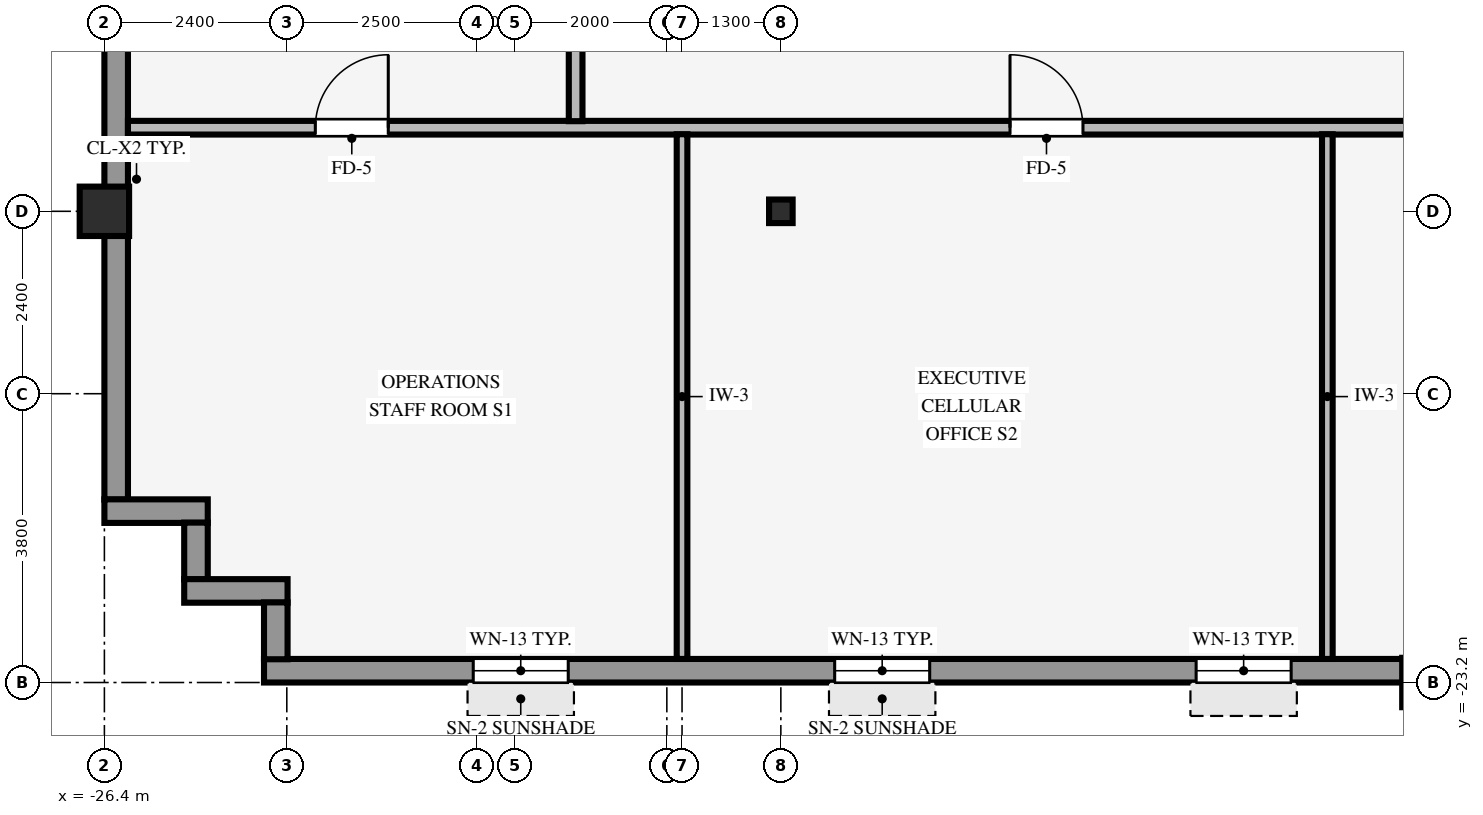
"""IFC4 building model, lengths in metres.
Left out: names, types, materials, properties, quantities, classifications, styles, units other than length and angle.
Written with IfcOpenShell. Run it as: python <this file> out.ifc"""

import sys

from ifc_helpers import new_model, si_unit, direction, frame, frame_2d, origin, origin_2d, place, context, subcontext, project, spatial, rectangle, hollow_rectangle, i_section, extrude, source, transform, mapped, element, fill, save


model = new_model("IFC4")
c1 = context("Model", 3, precision=1e-05, world=origin(), true_north=direction((0.0, 1.0)))
c2 = subcontext(c1, "Body", "Model", "MODEL_VIEW")
j1 = project(units=[si_unit("LENGTHUNIT", "METRE"), si_unit("PLANEANGLEUNIT", "RADIAN")], contexts=[c1])
p1 = place(None, origin())
s1 = spatial("IfcSite", under=j1, at=p1, CompositionType="ELEMENT")
p2 = place(p1, origin())
s2 = spatial("IfcBuilding", under=s1, at=p2, CompositionType="ELEMENT")
p3 = place(p2, frame((0.0, 0.0, 178.6)))
s3 = spatial("IfcBuildingStorey", under=s2, at=p3, CompositionType="ELEMENT", Elevation=178.6)
for number, where, z_axis, x_axis in (
    (1, (-26.4, -17.0, 0.0), (0.0, 0.0, 1.0), (1.0, 0.0, 0.0)),
    (2, (-9.0, -23.2, 0.0), (0.0, 0.0, 1.0), (1.0, 0.0, 0.0)),
):
    element("IfcColumn", number, at=place(p3, frame(where, z_axis=z_axis, x_axis=x_axis)), inside=s3, PredefinedType="COLUMN", context=c2, shape_type="SweptSolid", body=[
        extrude(hollow_rectangle(XDim=0.65, YDim=0.65, WallThickness=0.04, InnerFilletRadius=0.04, OuterFilletRadius=0.08, at=origin_2d()), origin(), (0.0, 0.0, 1.0), 3.37),
    ])
p4 = place(p3, frame((-17.5, -17.0, 0.0), z_axis=(0.0, 0.0, 1.0), x_axis=(1.0, 0.0, 0.0)))
e3 = element("IfcColumn", 3, at=p4, inside=s3, PredefinedType="COLUMN", context=c2, shape_type="SweptSolid", body=[
    extrude(i_section(OverallWidth=0.31, OverallDepth=0.31, WebThickness=0.015, FlangeThickness=0.015, FilletRadius=0.015, at=origin_2d()), origin(), (0.0, 0.0, 1.0), 3.37),
])
p5 = place(p3, frame((-24.3, -23.045, 0.0), z_axis=(0.0, 0.0, 1.0), x_axis=(1.0, 0.0, 0.0)))
e4 = element("IfcWall", 4, at=p5, inside=s3, PredefinedType="STANDARD", context=c2, shape_type="SweptSolid", body=[
    extrude(rectangle(XDim=44.8, YDim=0.31, at=frame_2d((22.4, 0.0))), origin(), (0.0, 0.0, 1.0), 2.705),
])
p6 = place(p5, frame((2.753, 0.0, 0.8)))
e5 = element("IfcOpeningElement", 5, at=p6, cuts=e4, PredefinedType="OPENING", context=c2, shape_type="SweptSolid", body=[
    extrude(rectangle(XDim=1.25, YDim=1.52, at=frame_2d((0.625, 0.76))), frame((0.0, 0.165, 0.0), z_axis=(0.0, -1.0, 0.0), x_axis=(1.0, 0.0, 0.0)), (0.0, 0.0, 1.0), 0.33),
])
p7 = place(p5, frame((7.508, 0.0, 0.8)))
e6 = element("IfcOpeningElement", 6, at=p7, cuts=e4, PredefinedType="OPENING", context=c2, shape_type="SweptSolid", body=[
    extrude(rectangle(XDim=1.25, YDim=1.52, at=frame_2d((0.625, 0.76))), frame((0.0, 0.165, 0.0), z_axis=(0.0, -1.0, 0.0), x_axis=(1.0, 0.0, 0.0)), (0.0, 0.0, 1.0), 0.33),
])
p8 = place(p5, frame((12.264, 0.0, 0.8)))
e7 = element("IfcOpeningElement", 7, at=p8, cuts=e4, PredefinedType="OPENING", context=c2, shape_type="SweptSolid", body=[
    extrude(rectangle(XDim=1.25, YDim=1.52, at=frame_2d((0.625, 0.76))), frame((0.0, 0.165, 0.0), z_axis=(0.0, -1.0, 0.0), x_axis=(1.0, 0.0, 0.0)), (0.0, 0.0, 1.0), 0.33),
])
p9 = place(p5, frame((17.019, 0.0, 0.8)))
e8 = element("IfcOpeningElement", 8, at=p9, cuts=e4, PredefinedType="OPENING", context=c2, shape_type="SweptSolid", body=[
    extrude(rectangle(XDim=1.25, YDim=1.52, at=frame_2d((0.625, 0.76))), frame((0.0, 0.165, 0.0), z_axis=(0.0, -1.0, 0.0), x_axis=(1.0, 0.0, 0.0)), (0.0, 0.0, 1.0), 0.33),
])
p10 = place(p5, frame((21.775, 0.0, 0.8)))
e9 = element("IfcOpeningElement", 9, at=p10, cuts=e4, PredefinedType="OPENING", context=c2, shape_type="SweptSolid", body=[
    extrude(rectangle(XDim=1.25, YDim=1.52, at=frame_2d((0.625, 0.76))), frame((0.0, 0.165, 0.0), z_axis=(0.0, -1.0, 0.0), x_axis=(1.0, 0.0, 0.0)), (0.0, 0.0, 1.0), 0.33),
])
p11 = place(p5, frame((26.531, 0.0, 0.8)))
e10 = element("IfcOpeningElement", 10, at=p11, cuts=e4, PredefinedType="OPENING", context=c2, shape_type="SweptSolid", body=[
    extrude(rectangle(XDim=1.25, YDim=1.52, at=frame_2d((0.625, 0.76))), frame((0.0, 0.165, 0.0), z_axis=(0.0, -1.0, 0.0), x_axis=(1.0, 0.0, 0.0)), (0.0, 0.0, 1.0), 0.33),
])
p12 = place(p5, frame((30.836, 0.0, 0.8)))
e11 = element("IfcOpeningElement", 11, at=p12, cuts=e4, PredefinedType="OPENING", context=c2, shape_type="SweptSolid", body=[
    extrude(rectangle(XDim=1.25, YDim=1.52, at=frame_2d((0.625, 0.76))), frame((0.0, 0.165, 0.0), z_axis=(0.0, -1.0, 0.0), x_axis=(1.0, 0.0, 0.0)), (0.0, 0.0, 1.0), 0.33),
])
p13 = place(p5, frame((36.042, 0.0, 0.8)))
e12 = element("IfcOpeningElement", 12, at=p13, cuts=e4, PredefinedType="OPENING", context=c2, shape_type="SweptSolid", body=[
    extrude(rectangle(XDim=1.25, YDim=1.52, at=frame_2d((0.625, 0.76))), frame((0.0, 0.165, 0.0), z_axis=(0.0, -1.0, 0.0), x_axis=(1.0, 0.0, 0.0)), (0.0, 0.0, 1.0), 0.33),
])
p14 = place(p5, frame((40.797, 0.0, 0.8)))
e13 = element("IfcOpeningElement", 13, at=p14, cuts=e4, PredefinedType="OPENING", context=c2, shape_type="SweptSolid", body=[
    extrude(rectangle(XDim=1.25, YDim=1.52, at=frame_2d((0.625, 0.76))), frame((0.0, 0.165, 0.0), z_axis=(0.0, -1.0, 0.0), x_axis=(1.0, 0.0, 0.0)), (0.0, 0.0, 1.0), 0.33),
])
p15 = place(p3, frame((-26.245, -20.794, 0.0), z_axis=(0.0, 0.0, 1.0), x_axis=(0.0, 1.0, 0.0)))
e14 = element("IfcWall", 14, at=p15, inside=s3, PredefinedType="STANDARD", context=c2, shape_type="SweptSolid", body=[
    extrude(rectangle(XDim=37.788, YDim=0.31, at=frame_2d((18.894, 0.0))), origin(), (0.0, 0.0, 1.0), 2.705),
])
p16 = place(p15, frame((7.644, 0.0, 0.8)))
e15 = element("IfcOpeningElement", 15, at=p16, cuts=e14, PredefinedType="OPENING", context=c2, shape_type="SweptSolid", body=[
    extrude(rectangle(XDim=2.05, YDim=1.52, at=frame_2d((1.025, 0.76))), frame((0.0, 0.165, 0.0), z_axis=(0.0, -1.0, 0.0), x_axis=(1.0, 0.0, 0.0)), (0.0, 0.0, 1.0), 0.33),
])
p17 = place(p15, frame((12.756, 0.0, 0.8)))
e16 = element("IfcOpeningElement", 16, at=p17, cuts=e14, PredefinedType="OPENING", context=c2, shape_type="SweptSolid", body=[
    extrude(rectangle(XDim=2.05, YDim=1.52, at=frame_2d((1.025, 0.76))), frame((0.0, 0.165, 0.0), z_axis=(0.0, -1.0, 0.0), x_axis=(1.0, 0.0, 0.0)), (0.0, 0.0, 1.0), 0.33),
])
p18 = place(p15, frame((17.869, 0.0, 0.8)))
e17 = element("IfcOpeningElement", 17, at=p18, cuts=e14, PredefinedType="OPENING", context=c2, shape_type="SweptSolid", body=[
    extrude(rectangle(XDim=2.05, YDim=1.52, at=frame_2d((1.025, 0.76))), frame((0.0, 0.165, 0.0), z_axis=(0.0, -1.0, 0.0), x_axis=(1.0, 0.0, 0.0)), (0.0, 0.0, 1.0), 0.33),
])
p19 = place(p15, frame((22.531, 0.0, 0.8)))
e18 = element("IfcOpeningElement", 18, at=p19, cuts=e14, PredefinedType="OPENING", context=c2, shape_type="SweptSolid", body=[
    extrude(rectangle(XDim=2.05, YDim=1.52, at=frame_2d((1.025, 0.76))), frame((0.0, 0.165, 0.0), z_axis=(0.0, -1.0, 0.0), x_axis=(1.0, 0.0, 0.0)), (0.0, 0.0, 1.0), 0.33),
])
p20 = place(p15, frame((27.194, 0.0, 0.8)))
e19 = element("IfcOpeningElement", 19, at=p20, cuts=e14, PredefinedType="OPENING", context=c2, shape_type="SweptSolid", body=[
    extrude(rectangle(XDim=2.05, YDim=1.52, at=frame_2d((1.025, 0.76))), frame((0.0, 0.165, 0.0), z_axis=(0.0, -1.0, 0.0), x_axis=(1.0, 0.0, 0.0)), (0.0, 0.0, 1.0), 0.33),
])
p21 = place(p15, frame((33.207, 0.0, 0.8)))
e20 = element("IfcOpeningElement", 20, at=p21, cuts=e14, PredefinedType="OPENING", context=c2, shape_type="SweptSolid", body=[
    extrude(rectangle(XDim=2.05, YDim=1.52, at=frame_2d((1.025, 0.76))), frame((0.0, 0.165, 0.0), z_axis=(0.0, -1.0, 0.0), x_axis=(1.0, 0.0, 0.0)), (0.0, 0.0, 1.0), 0.33),
])
p22 = place(p3, frame((-26.4, -20.945, 0.0), z_axis=(0.0, 0.0, 1.0), x_axis=(1.0, 0.0, 0.0)))
e21 = element("IfcWall", 21, at=p22, inside=s3, PredefinedType="STANDARD", context=c2, shape_type="SweptSolid", body=[
    extrude(rectangle(XDim=1.36, YDim=0.31, at=frame_2d((0.68, 0.0))), origin(), (0.0, 0.0, 1.0), 3.36),
])
p23 = place(p3, frame((-25.195, -21.844, 0.0), z_axis=(0.0, 0.0, 1.0), x_axis=(0.0, 1.0, 0.0)))
e22 = element("IfcWall", 22, at=p23, inside=s3, PredefinedType="STANDARD", context=c2, shape_type="SweptSolid", body=[
    extrude(rectangle(XDim=0.748, YDim=0.31, at=frame_2d((0.374, 0.0))), origin(), (0.0, 0.0, 1.0), 3.36),
])
p24 = place(p3, frame((-25.35, -21.995, 0.0), z_axis=(0.0, 0.0, 1.0), x_axis=(1.0, 0.0, 0.0)))
e23 = element("IfcWall", 23, at=p24, inside=s3, PredefinedType="STANDARD", context=c2, shape_type="SweptSolid", body=[
    extrude(rectangle(XDim=1.36, YDim=0.31, at=frame_2d((0.68, 0.0))), origin(), (0.0, 0.0, 1.0), 3.36),
])
p25 = place(p3, frame((-24.145, -22.894, 0.0), z_axis=(0.0, 0.0, 1.0), x_axis=(0.0, 1.0, 0.0)))
e24 = element("IfcWall", 24, at=p25, inside=s3, PredefinedType="STANDARD", context=c2, shape_type="SweptSolid", body=[
    extrude(rectangle(XDim=0.748, YDim=0.31, at=frame_2d((0.374, 0.0))), origin(), (0.0, 0.0, 1.0), 3.36),
])
p26 = place(p3, frame((-26.09, -15.9, 0.0), z_axis=(0.0, 0.0, 1.0), x_axis=(1.0, 0.0, 0.0)))
e25 = element("IfcWall", 25, at=p26, inside=s3, PredefinedType="PARTITIONING", context=c2, shape_type="SweptSolid", body=[
    extrude(rectangle(XDim=48.38, YDim=0.18, at=frame_2d((24.19, 0.0))), origin(), (0.0, 0.0, 1.0), 3.36),
])
p27 = place(p26, frame((40.51, 0.0, 0.0)))
e26 = element("IfcOpeningElement", 26, at=p27, cuts=e25, PredefinedType="OPENING", context=c2, shape_type="SweptSolid", body=[
    extrude(rectangle(XDim=0.96, YDim=2.1, at=frame_2d((0.48, 1.05))), frame((0.0, 0.1, 0.0), z_axis=(0.0, -1.0, 0.0), x_axis=(1.0, 0.0, 0.0)), (0.0, 0.0, 1.0), 0.2),
])
p28 = place(p26, frame((19.995, 0.0, 0.0)))
e27 = element("IfcOpeningElement", 27, at=p28, cuts=e25, PredefinedType="OPENING", context=c2, shape_type="SweptSolid", body=[
    extrude(rectangle(XDim=0.96, YDim=2.1, at=frame_2d((0.48, 1.05))), frame((0.0, 0.1, 0.0), z_axis=(0.0, -1.0, 0.0), x_axis=(1.0, 0.0, 0.0)), (0.0, 0.0, 1.0), 0.2),
])
p29 = place(p26, frame((28.45, 0.0, 0.0)))
e28 = element("IfcOpeningElement", 28, at=p29, cuts=e25, PredefinedType="OPENING", context=c2, shape_type="SweptSolid", body=[
    extrude(rectangle(XDim=0.96, YDim=2.1, at=frame_2d((0.48, 1.05))), frame((0.0, 0.1, 0.0), z_axis=(0.0, -1.0, 0.0), x_axis=(1.0, 0.0, 0.0)), (0.0, 0.0, 1.0), 0.2),
])
p30 = place(p26, frame((11.605, 0.0, 0.0)))
e29 = element("IfcOpeningElement", 29, at=p30, cuts=e25, PredefinedType="OPENING", context=c2, shape_type="SweptSolid", body=[
    extrude(rectangle(XDim=0.96, YDim=2.1, at=frame_2d((0.48, 1.05))), frame((0.0, 0.1, 0.0), z_axis=(0.0, -1.0, 0.0), x_axis=(1.0, 0.0, 0.0)), (0.0, 0.0, 1.0), 0.2),
])
p31 = place(p26, frame((2.465, 0.0, 0.0)))
e30 = element("IfcOpeningElement", 30, at=p31, cuts=e25, PredefinedType="OPENING", context=c2, shape_type="SweptSolid", body=[
    extrude(rectangle(XDim=0.96, YDim=2.1, at=frame_2d((0.48, 1.05))), frame((0.0, 0.1, 0.0), z_axis=(0.0, -1.0, 0.0), x_axis=(1.0, 0.0, 0.0)), (0.0, 0.0, 1.0), 0.2),
])
p32 = place(p3, frame((-20.2, -15.814, 0.0), z_axis=(0.0, 0.0, 1.0), x_axis=(0.0, 1.0, 0.0)))
e31 = element("IfcWall", 31, at=p32, inside=s3, PredefinedType="PARTITIONING", context=c2, shape_type="SweptSolid", body=[
    extrude(rectangle(XDim=31.628, YDim=0.18, at=frame_2d((15.814, 0.0))), origin(), (0.0, 0.0, 1.0), 3.36),
])
p33 = place(p32, frame((10.684, 0.0, 0.0)))
e32 = element("IfcOpeningElement", 32, at=p33, cuts=e31, PredefinedType="OPENING", context=c2, shape_type="SweptSolid", body=[
    extrude(rectangle(XDim=0.96, YDim=2.1, at=frame_2d((0.48, 1.05))), frame((0.0, 0.1, 0.0), z_axis=(0.0, -1.0, 0.0), x_axis=(1.0, 0.0, 0.0)), (0.0, 0.0, 1.0), 0.2),
])
p34 = place(p32, frame((24.184, 0.0, 0.0)))
e33 = element("IfcOpeningElement", 33, at=p34, cuts=e31, PredefinedType="OPENING", context=c2, shape_type="SweptSolid", body=[
    extrude(rectangle(XDim=0.96, YDim=2.1, at=frame_2d((0.48, 1.05))), frame((0.0, 0.1, 0.0), z_axis=(0.0, -1.0, 0.0), x_axis=(1.0, 0.0, 0.0)), (0.0, 0.0, 1.0), 0.2),
])
for number, where, z_axis, x_axis in (
    (34, (-18.8, -22.89, 0.0), (0.0, 0.0, 1.0), (0.0, 1.0, 0.0)),
    (35, (-10.31, -22.89, 0.0), (0.0, 0.0, 1.0), (0.0, 1.0, 0.0)),
):
    element("IfcWall", number, at=place(p3, frame(where, z_axis=z_axis, x_axis=x_axis)), inside=s3, PredefinedType="PARTITIONING", context=c2, shape_type="SweptSolid", body=[
        extrude(rectangle(XDim=6.904, YDim=0.14, at=frame_2d((3.452, 0.0))), origin(), (0.0, 0.0, 1.0), 3.36),
    ])
m1 = source(origin(), c2, "Body", "SweptSolid", [
    extrude(rectangle(XDim=1.25, YDim=1.52, at=frame_2d((0.625, 0.76))), frame((0.0, 0.03, 0.0), z_axis=(0.0, -1.0, 0.0), x_axis=(1.0, 0.0, 0.0)), (0.0, 0.0, 1.0), 0.06),
])
p35 = place(p6, origin())
e36 = element("IfcWindow", 36, at=p35, inside=s3, PartitioningType="SINGLE_PANEL", PredefinedType="WINDOW", context=c2, shape_type="MappedRepresentation", body=[
    mapped(m1, transform((0.0, 0.0, 0.0), scale=1.0)),
])
fill(e5, e36)
p36 = place(p7, origin())
e37 = element("IfcWindow", 37, at=p36, inside=s3, PartitioningType="SINGLE_PANEL", PredefinedType="WINDOW", context=c2, shape_type="MappedRepresentation", body=[
    mapped(m1, transform((0.0, 0.0, 0.0), scale=1.0)),
])
fill(e6, e37)
p37 = place(p8, origin())
e38 = element("IfcWindow", 38, at=p37, inside=s3, PartitioningType="SINGLE_PANEL", PredefinedType="WINDOW", context=c2, shape_type="MappedRepresentation", body=[
    mapped(m1, transform((0.0, 0.0, 0.0), scale=1.0)),
])
fill(e7, e38)
m2 = source(origin(), c2, "Body", "SweptSolid", [
    extrude(rectangle(XDim=0.96, YDim=2.1, at=frame_2d((0.48, 1.05))), frame((0.0, 0.025, 0.0), z_axis=(0.0, -1.0, 0.0), x_axis=(1.0, 0.0, 0.0)), (0.0, 0.0, 1.0), 0.05),
])
p38 = place(p30, origin())
e39 = element("IfcDoor", 39, at=p38, inside=s3, OperationType="SINGLE_SWING_LEFT", PredefinedType="DOOR", context=c2, shape_type="MappedRepresentation", body=[
    mapped(m2, transform((0.0, 0.0, 0.0), scale=1.0)),
])
fill(e29, e39)
p39 = place(p31, origin())
e40 = element("IfcDoor", 40, at=p39, inside=s3, OperationType="SINGLE_SWING_RIGHT", PredefinedType="DOOR", context=c2, shape_type="MappedRepresentation", body=[
    mapped(m2, transform((0.0, 0.0, 0.0), scale=1.0)),
])
fill(e30, e40)
save(model, sys.argv[1])
